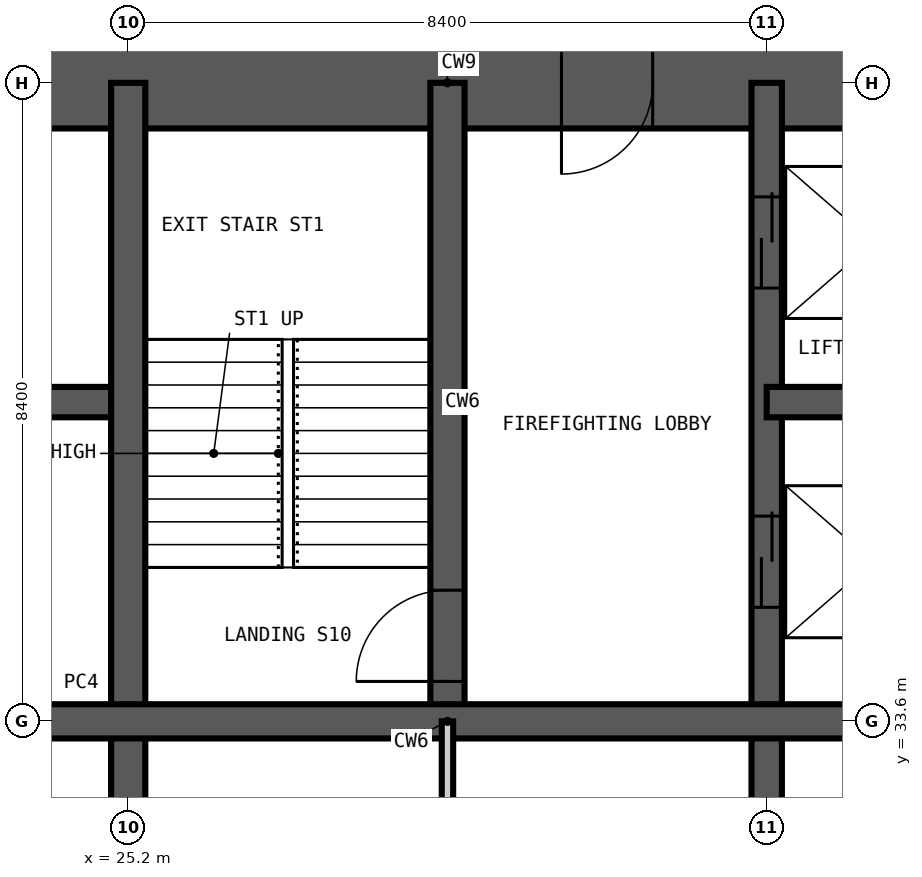
"""IFC4 building model, lengths in metres.
Left out: names, types, materials, properties, quantities, classifications, styles, units other than length and angle.
Written with IfcOpenShell. Run it as: python <this file> out.ifc"""

import sys

from ifc_helpers import new_model, si_unit, direction, frame, frame_2d, origin, place, context, subcontext, project, spatial, rectangle, extrude, element, fill, save


model = new_model("IFC4")
c1 = context("Model", 3, precision=1e-05, world=origin(), true_north=direction((0.0, 1.0)))
c2 = subcontext(c1, "Body", "Model", "MODEL_VIEW")
j1 = project(units=[si_unit("LENGTHUNIT", "METRE"), si_unit("PLANEANGLEUNIT", "RADIAN")], contexts=[c1])
p1 = place(None, origin())
s1 = spatial("IfcSite", under=j1, at=p1, CompositionType="ELEMENT")
p2 = place(p1, origin())
s2 = spatial("IfcBuilding", under=s1, at=p2, CompositionType="ELEMENT")
p3 = place(p2, frame((0.0, 0.0, 213.0)))
s3 = spatial("IfcBuildingStorey", under=s2, at=p3, CompositionType="ELEMENT", Elevation=213.0)
p4 = place(p3, frame((42.6, 42.0, -0.35), z_axis=(0.0, 0.0, 1.0), x_axis=(-1.0, 0.0, 0.0)))
e1 = element("IfcWall", 1, at=p4, inside=s3, PredefinedType="SHEAR", context=c2, shape_type="SweptSolid", body=[
    extrude(rectangle(XDim=26.4, YDim=1.2, at=frame_2d((13.2, 0.0))), origin(), (0.0, 0.0, 1.0), 3.6),
])
p5 = place(p4, frame((21.1, 0.0, 0.35)))
e2 = element("IfcOpeningElement", 2, at=p5, cuts=e1, PredefinedType="OPENING", context=c2, shape_type="SweptSolid", body=[
    extrude(rectangle(XDim=1.0, YDim=2.1, at=frame_2d((0.5, 1.05))), frame((0.0, 0.61, 0.0), z_axis=(0.0, -1.0, 0.0), x_axis=(1.0, 0.0, 0.0)), (0.0, 0.0, 1.0), 1.22),
])
p6 = place(p4, frame((10.5, 0.0, 0.35)))
e3 = element("IfcOpeningElement", 3, at=p6, cuts=e1, PredefinedType="OPENING", context=c2, shape_type="SweptSolid", body=[
    extrude(rectangle(XDim=1.2, YDim=2.2, at=frame_2d((0.6, 1.1))), frame((0.0, 0.61, 0.0), z_axis=(0.0, -1.0, 0.0), x_axis=(1.0, 0.0, 0.0)), (0.0, 0.0, 1.0), 1.22),
])
p7 = place(p3, frame((33.6, 16.8, -0.35), z_axis=(0.0, 0.0, 1.0), x_axis=(0.0, 1.0, 0.0)))
e4 = element("IfcWall", 4, at=p7, inside=s3, PredefinedType="SHEAR", context=c2, shape_type="SweptSolid", body=[
    extrude(rectangle(XDim=25.2, YDim=0.4, at=frame_2d((12.6, 0.0))), origin(), (0.0, 0.0, 1.0), 3.6),
])
p8 = place(p7, frame((22.5, 0.0, 0.35)))
e5 = element("IfcOpeningElement", 5, at=p8, cuts=e4, PredefinedType="OPENING", context=c2, shape_type="SweptSolid", body=[
    extrude(rectangle(XDim=1.2, YDim=2.2, at=frame_2d((0.6, 1.1))), frame((0.0, 0.21, 0.0), z_axis=(0.0, -1.0, 0.0), x_axis=(1.0, 0.0, 0.0)), (0.0, 0.0, 1.0), 0.42),
])
p9 = place(p7, frame((18.3, 0.0, 0.35)))
e6 = element("IfcOpeningElement", 6, at=p9, cuts=e4, PredefinedType="OPENING", context=c2, shape_type="SweptSolid", body=[
    extrude(rectangle(XDim=1.2, YDim=2.2, at=frame_2d((0.6, 1.1))), frame((0.0, 0.21, 0.0), z_axis=(0.0, -1.0, 0.0), x_axis=(1.0, 0.0, 0.0)), (0.0, 0.0, 1.0), 0.42),
])
p10 = place(p7, frame((12.1, 0.0, 0.35)))
e7 = element("IfcOpeningElement", 7, at=p10, cuts=e4, PredefinedType="OPENING", context=c2, shape_type="SweptSolid", body=[
    extrude(rectangle(XDim=1.0, YDim=2.1, at=frame_2d((0.5, 1.05))), frame((0.0, 0.21, 0.0), z_axis=(0.0, -1.0, 0.0), x_axis=(1.0, 0.0, 0.0)), (0.0, 0.0, 1.0), 0.42),
])
p11 = place(p3, frame((16.8, 37.8, -0.35), z_axis=(0.0, 0.0, 1.0), x_axis=(1.0, 0.0, 0.0)))
e8 = element("IfcWall", 8, at=p11, inside=s3, PredefinedType="SHEAR", context=c2, shape_type="SweptSolid", body=[
    extrude(rectangle(XDim=8.4, YDim=0.4, at=frame_2d((4.2, 0.0))), origin(), (0.0, 0.0, 1.0), 3.6),
])
p12 = place(p3, frame((33.6, 37.8, -0.35), z_axis=(0.0, 0.0, 1.0), x_axis=(1.0, 0.0, 0.0)))
e9 = element("IfcWall", 9, at=p12, inside=s3, PredefinedType="SHEAR", context=c2, shape_type="SweptSolid", body=[
    extrude(rectangle(XDim=2.8, YDim=0.4, at=frame_2d((1.4, 0.0))), origin(), (0.0, 0.0, 1.0), 3.6),
])
p13 = place(p3, frame((25.2, 16.8, -0.35), z_axis=(0.0, 0.0, 1.0), x_axis=(0.0, 1.0, 0.0)))
e10 = element("IfcWall", 10, at=p13, inside=s3, PredefinedType="SHEAR", context=c2, shape_type="SweptSolid", body=[
    extrude(rectangle(XDim=25.2, YDim=0.45, at=frame_2d((12.6, 0.0))), origin(), (0.0, 0.0, 1.0), 3.6),
])
p14 = place(p3, frame((29.4, 33.6, -0.35), z_axis=(0.0, 0.0, 1.0), x_axis=(0.0, 1.0, 0.0)))
e11 = element("IfcWall", 11, at=p14, inside=s3, PredefinedType="SHEAR", context=c2, shape_type="SweptSolid", body=[
    extrude(rectangle(XDim=8.4, YDim=0.45, at=frame_2d((4.2, 0.0))), origin(), (0.0, 0.0, 1.0), 3.6),
])
p15 = place(p14, frame((0.525, 0.0, 0.35)))
e12 = element("IfcOpeningElement", 12, at=p15, cuts=e11, PredefinedType="OPENING", context=c2, shape_type="SweptSolid", body=[
    extrude(rectangle(XDim=1.2, YDim=2.2, at=frame_2d((0.6, 1.1))), frame((0.0, 0.235, 0.0), z_axis=(0.0, -1.0, 0.0), x_axis=(1.0, 0.0, 0.0)), (0.0, 0.0, 1.0), 0.47),
])
p16 = place(p3, frame((16.8, 33.6, -0.35), z_axis=(0.0, 0.0, 1.0), x_axis=(1.0, 0.0, 0.0)))
e13 = element("IfcWall", 13, at=p16, inside=s3, PredefinedType="SHEAR", context=c2, shape_type="SweptSolid", body=[
    extrude(rectangle(XDim=25.2, YDim=0.45, at=frame_2d((12.6, 0.0))), origin(), (0.0, 0.0, 1.0), 3.6),
])
p17 = place(p3, frame((29.4, 25.2, 0.0), z_axis=(0.0, 0.0, 1.0), x_axis=(0.0, 1.0, 0.0)))
e14 = element("IfcWall", 14, at=p17, inside=s3, PredefinedType="PARTITIONING", context=c2, shape_type="SweptSolid", body=[
    extrude(rectangle(XDim=8.4, YDim=0.15, at=frame_2d((4.2, 0.0))), origin(), (0.0, 0.0, 1.0), 3.25),
])
p18 = place(p17, frame((3.7, 0.0, 0.0)))
e15 = element("IfcOpeningElement", 15, at=p18, cuts=e14, PredefinedType="OPENING", context=c2, shape_type="SweptSolid", body=[
    extrude(rectangle(XDim=1.0, YDim=2.1, at=frame_2d((0.5, 1.05))), frame((0.0, 0.085, 0.0), z_axis=(0.0, -1.0, 0.0), x_axis=(1.0, 0.0, 0.0)), (0.0, 0.0, 1.0), 0.17),
])
p19 = place(p15, origin())
e16 = element("IfcDoor", 16, at=p19, inside=s3, OperationType="SINGLE_SWING_LEFT", PredefinedType="DOOR", context=c2, shape_type="SweptSolid", body=[
    extrude(rectangle(XDim=1.2, YDim=2.2, at=frame_2d((0.6, 1.1))), frame((0.0, 0.025, 0.0), z_axis=(0.0, -1.0, 0.0), x_axis=(1.0, 0.0, 0.0)), (0.0, 0.0, 1.0), 0.05),
])
fill(e12, e16)
p20 = place(p8, origin())
e17 = element("IfcDoor", 17, at=p20, inside=s3, OperationType="DOUBLE_DOOR_SLIDING", PredefinedType="DOOR", context=c2, shape_type="SweptSolid", body=[
    extrude(rectangle(XDim=1.2, YDim=2.2, at=frame_2d((0.6, 1.1))), frame((0.0, 0.025, 0.0), z_axis=(0.0, -1.0, 0.0), x_axis=(1.0, 0.0, 0.0)), (0.0, 0.0, 1.0), 0.05),
])
fill(e5, e17)
p21 = place(p9, origin())
e18 = element("IfcDoor", 18, at=p21, inside=s3, OperationType="DOUBLE_DOOR_SLIDING", PredefinedType="DOOR", context=c2, shape_type="SweptSolid", body=[
    extrude(rectangle(XDim=1.2, YDim=2.2, at=frame_2d((0.6, 1.1))), frame((0.0, 0.025, 0.0), z_axis=(0.0, -1.0, 0.0), x_axis=(1.0, 0.0, 0.0)), (0.0, 0.0, 1.0), 0.05),
])
fill(e6, e18)
p22 = place(p6, origin())
e19 = element("IfcDoor", 19, at=p22, inside=s3, OperationType="SINGLE_SWING_RIGHT", PredefinedType="DOOR", context=c2, shape_type="SweptSolid", body=[
    extrude(rectangle(XDim=1.2, YDim=2.2, at=frame_2d((0.6, 1.1))), frame((0.0, 0.025, 0.0), z_axis=(0.0, -1.0, 0.0), x_axis=(1.0, 0.0, 0.0)), (0.0, 0.0, 1.0), 0.05),
])
fill(e3, e19)
save(model, sys.argv[1])
